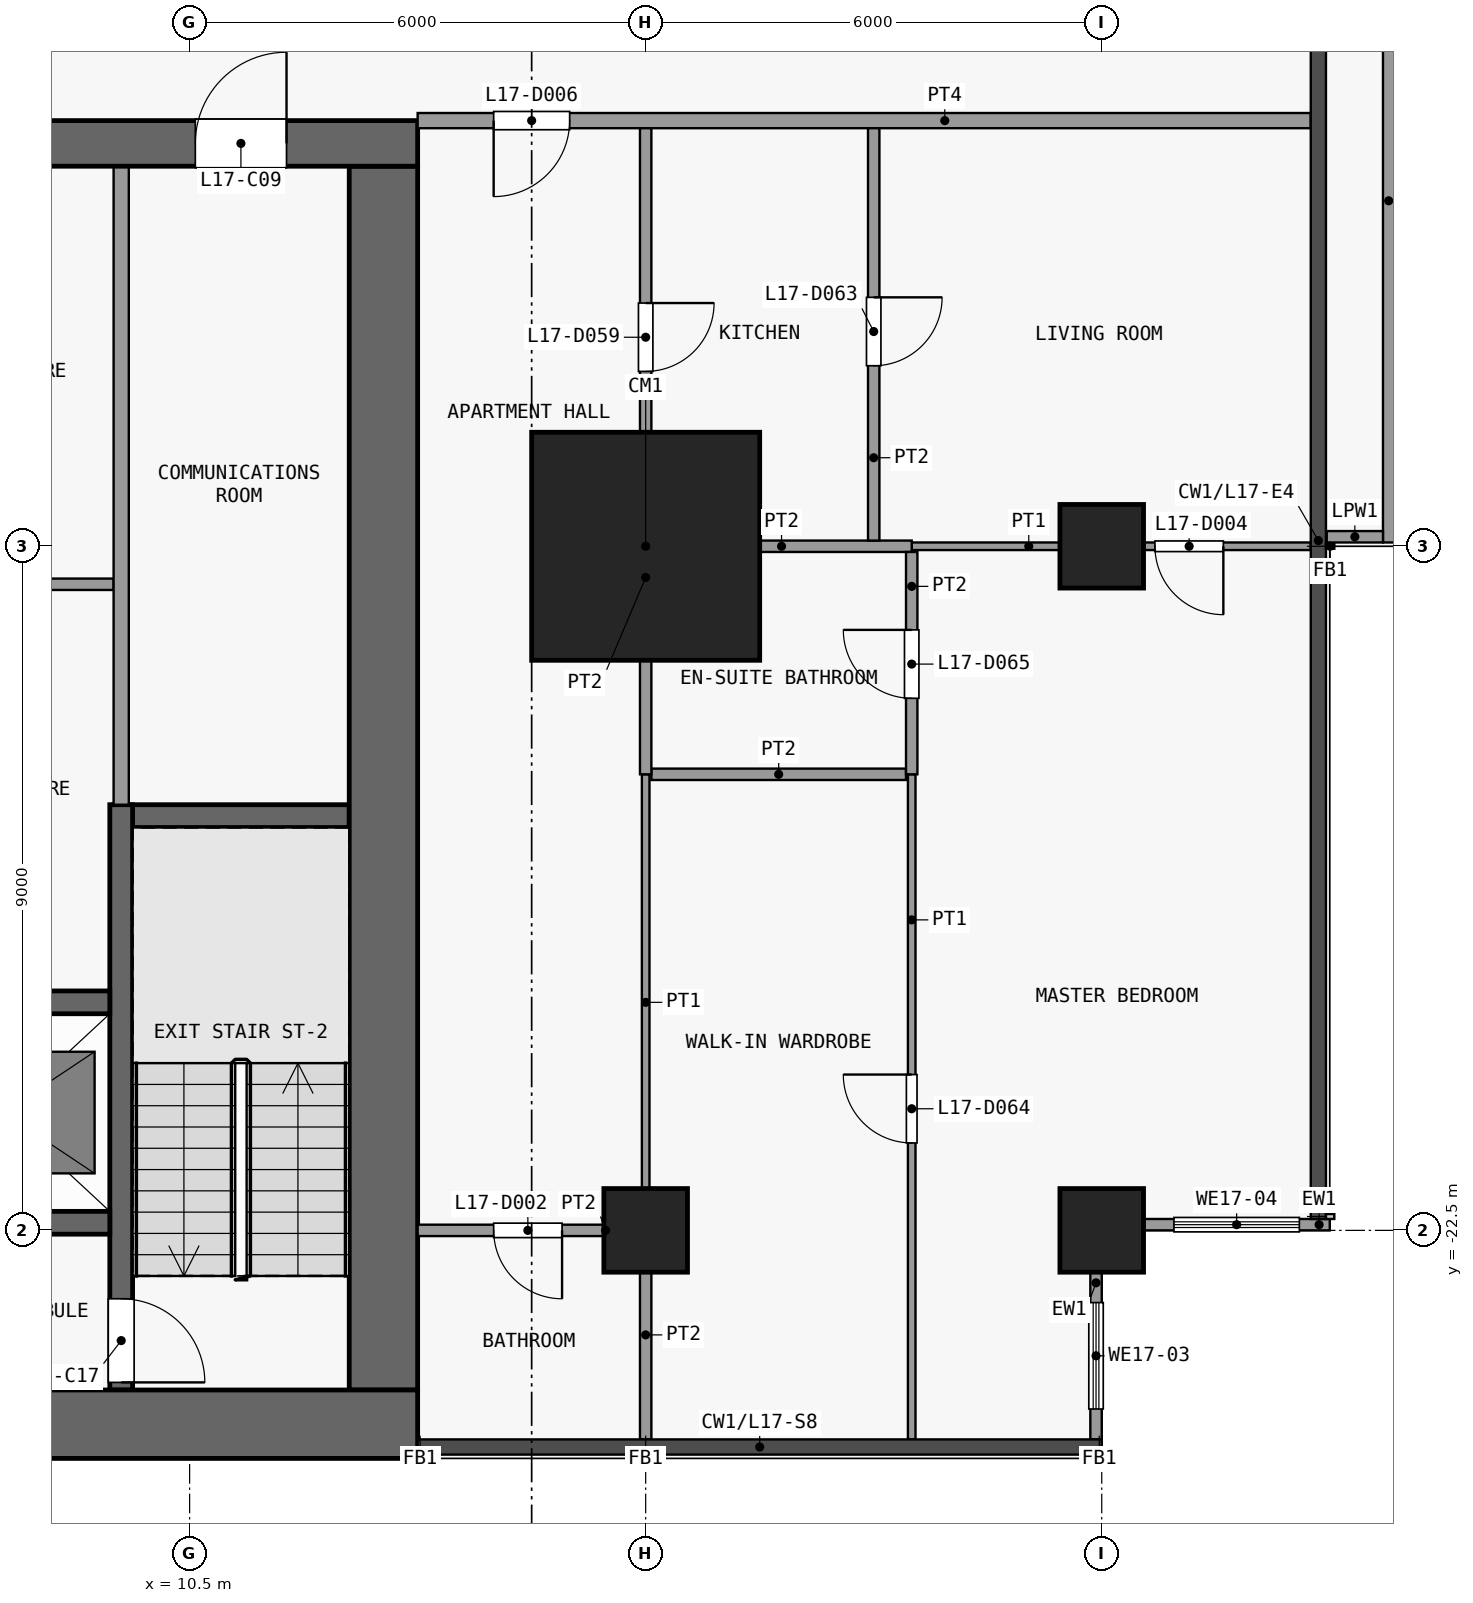
"""IFC4 building model, lengths in metres.
Left out: names, types, materials, properties, quantities, classifications, styles, units other than length and angle.
Written with IfcOpenShell. Run it as: python <this file> out.ifc"""

import sys

from ifc_helpers import new_model, si_unit, direction, frame, frame_2d, origin, origin_2d, place, context, subcontext, project, spatial, rectangle, extrude, element, fill, save


model = new_model("IFC4")
c1 = context("Model", 3, precision=1e-05, world=origin(), true_north=direction((0.0, 1.0)))
c2 = subcontext(c1, "Body", "Model", "MODEL_VIEW")
j1 = project(units=[si_unit("LENGTHUNIT", "METRE"), si_unit("PLANEANGLEUNIT", "RADIAN")], contexts=[c1])
p1 = place(None, origin())
s1 = spatial("IfcSite", under=j1, at=p1, CompositionType="ELEMENT")
p2 = place(p1, origin())
s2 = spatial("IfcBuilding", under=s1, at=p2, CompositionType="ELEMENT")
p3 = place(p2, frame((0.0, 0.0, 72.1)))
s3 = spatial("IfcBuildingStorey", under=s2, at=p3, CompositionType="ELEMENT", Elevation=72.1)
p4 = place(p3, frame((16.5, -22.5, 0.0), z_axis=(0.0, 0.0, 1.0), x_axis=(1.0, 0.0, 0.0)))
e1 = element("IfcColumn", 1, at=p4, inside=s3, PredefinedType="COLUMN", context=c2, shape_type="SweptSolid", body=[
    extrude(rectangle(XDim=1.1, YDim=1.1, at=origin_2d()), origin(), (0.0, 0.0, 1.0), 3.6),
])
p5 = place(p3, frame((16.5, -13.5, 0.0), z_axis=(0.0, 0.0, 1.0), x_axis=(1.0, 0.0, 0.0)))
e2 = element("IfcColumn", 2, at=p5, inside=s3, PredefinedType="COLUMN", context=c2, shape_type="SweptSolid", body=[
    extrude(rectangle(XDim=3.0, YDim=3.0, at=origin_2d()), origin(), (0.0, 0.0, 1.0), 3.6),
])
for number, where, z_axis, x_axis in (
    (3, (22.5, -22.5, 0.0), (0.0, 0.0, 1.0), (1.0, 0.0, 0.0)),
    (4, (22.5, -13.5, 0.0), (0.0, 0.0, 1.0), (1.0, 0.0, 0.0)),
):
    element("IfcColumn", number, at=place(p3, frame(where, z_axis=z_axis, x_axis=x_axis)), inside=s3, PredefinedType="COLUMN", context=c2, shape_type="SweptSolid", body=[
        extrude(rectangle(XDim=1.1, YDim=1.1, at=origin_2d()), origin(), (0.0, 0.0, 1.0), 3.6),
    ])
p6 = place(p3, frame((-13.5, -25.05, 0.0), z_axis=(0.0, 0.0, 1.0), x_axis=(1.0, 0.0, 0.0)))
e5 = element("IfcWall", 5, at=p6, inside=s3, PredefinedType="SHEAR", context=c2, shape_type="SweptSolid", body=[
    extrude(rectangle(XDim=27.0, YDim=0.9, at=frame_2d((13.5, 0.0))), origin(), (0.0, 0.0, 1.0), 3.15),
])
p7 = place(p3, frame((-13.5, -8.2, 0.0), z_axis=(0.0, 0.0, 1.0), x_axis=(1.0, 0.0, 0.0)))
e6 = element("IfcWall", 6, at=p7, inside=s3, PredefinedType="SHEAR", context=c2, shape_type="SweptSolid", body=[
    extrude(rectangle(XDim=27.0, YDim=0.6, at=frame_2d((13.5, 0.0))), origin(), (0.0, 0.0, 1.0), 3.15),
])
p8 = place(p7, frame((7.8, 0.0, 0.0)))
e7 = element("IfcOpeningElement", 7, at=p8, cuts=e6, PredefinedType="OPENING", context=c2, shape_type="SweptSolid", body=[
    extrude(rectangle(XDim=1.8, YDim=2.1, at=frame_2d((0.9, 1.05))), frame((0.0, 0.31, 0.0), z_axis=(0.0, -1.0, 0.0), x_axis=(1.0, 0.0, 0.0)), (0.0, 0.0, 1.0), 0.62),
])
p9 = place(p7, frame((17.4, 0.0, 0.0)))
e8 = element("IfcOpeningElement", 8, at=p9, cuts=e6, PredefinedType="OPENING", context=c2, shape_type="SweptSolid", body=[
    extrude(rectangle(XDim=1.8, YDim=2.1, at=frame_2d((0.9, 1.05))), frame((0.0, 0.31, 0.0), z_axis=(0.0, -1.0, 0.0), x_axis=(1.0, 0.0, 0.0)), (0.0, 0.0, 1.0), 0.62),
])
p10 = place(p7, frame((2.725, 0.0, 0.0)))
e9 = element("IfcOpeningElement", 9, at=p10, cuts=e6, PredefinedType="OPENING", context=c2, shape_type="SweptSolid", body=[
    extrude(rectangle(XDim=0.9, YDim=2.1, at=frame_2d((0.45, 1.05))), frame((0.0, 0.31, 0.0), z_axis=(0.0, -1.0, 0.0), x_axis=(1.0, 0.0, 0.0)), (0.0, 0.0, 1.0), 0.62),
])
p11 = place(p7, frame((24.075, 0.0, 0.0)))
e10 = element("IfcOpeningElement", 10, at=p11, cuts=e6, PredefinedType="OPENING", context=c2, shape_type="SweptSolid", body=[
    extrude(rectangle(XDim=1.2, YDim=2.1, at=frame_2d((0.6, 1.05))), frame((0.0, 0.31, 0.0), z_axis=(0.0, -1.0, 0.0), x_axis=(1.0, 0.0, 0.0)), (0.0, 0.0, 1.0), 0.62),
])
p12 = place(p3, frame((13.05, -24.6, 0.0), z_axis=(0.0, 0.0, 1.0), x_axis=(0.0, 1.0, 0.0)))
e11 = element("IfcWall", 11, at=p12, inside=s3, PredefinedType="SHEAR", context=c2, shape_type="SweptSolid", body=[
    extrude(rectangle(XDim=16.1, YDim=0.9, at=frame_2d((8.05, 0.0))), origin(), (0.0, 0.0, 1.0), 3.15),
])
p13 = place(p3, frame((6.35, -22.4, 0.0), z_axis=(0.0, 0.0, 1.0), x_axis=(1.0, 0.0, 0.0)))
e12 = element("IfcWall", 12, at=p13, inside=s3, PredefinedType="SHEAR", context=c2, shape_type="SweptSolid", body=[
    extrude(rectangle(XDim=3.1, YDim=0.3, at=frame_2d((1.55, 0.0))), origin(), (0.0, 0.0, 1.0), 3.15),
])
p14 = place(p3, frame((6.425, -19.5, 0.0), z_axis=(0.0, 0.0, 1.0), x_axis=(1.0, 0.0, 0.0)))
e13 = element("IfcWall", 13, at=p14, inside=s3, PredefinedType="SHEAR", context=c2, shape_type="SweptSolid", body=[
    extrude(rectangle(XDim=3.025, YDim=0.3, at=frame_2d((1.512, 0.0))), origin(), (0.0, 0.0, 1.0), 3.15),
])
p15 = place(p3, frame((9.5, -17.05, 0.0), z_axis=(0.0, 0.0, 1.0), x_axis=(1.0, 0.0, 0.0)))
e14 = element("IfcWall", 14, at=p15, inside=s3, PredefinedType="SHEAR", context=c2, shape_type="SweptSolid", body=[
    extrude(rectangle(XDim=3.1, YDim=0.3, at=frame_2d((1.55, 0.0))), origin(), (0.0, 0.0, 1.0), 3.15),
])
p16 = place(p3, frame((6.575, -14.0, 0.0), z_axis=(0.0, 0.0, 1.0), x_axis=(1.0, 0.0, 0.0)))
e15 = element("IfcWall", 15, at=p16, inside=s3, PredefinedType="PARTITIONING", context=c2, shape_type="SweptSolid", body=[
    extrude(rectangle(XDim=2.925, YDim=0.15, at=frame_2d((1.462, 0.0))), origin(), (0.0, 0.0, 1.0), 3.15),
])
p17 = place(p3, frame((9.6, -16.9, 0.0), z_axis=(0.0, 0.0, 1.0), x_axis=(0.0, -1.0, 0.0)))
e16 = element("IfcWall", 16, at=p17, inside=s3, PredefinedType="SHEAR", context=c2, shape_type="SweptSolid", body=[
    extrude(rectangle(XDim=7.7, YDim=0.3, at=frame_2d((3.85, 0.0))), origin(), (0.0, 0.0, 1.0), 3.15),
])
p18 = place(p17, frame((6.5, 0.0, 0.0)))
e17 = element("IfcOpeningElement", 17, at=p18, cuts=e16, PredefinedType="OPENING", context=c2, shape_type="SweptSolid", body=[
    extrude(rectangle(XDim=1.1, YDim=2.1, at=frame_2d((0.55, 1.05))), frame((0.0, 0.16, 0.0), z_axis=(0.0, -1.0, 0.0), x_axis=(1.0, 0.0, 0.0)), (0.0, 0.0, 1.0), 0.32),
])
p19 = place(p3, frame((9.6, -16.9, 0.0), z_axis=(0.0, 0.0, 1.0), x_axis=(0.0, 1.0, 0.0)))
e18 = element("IfcWall", 18, at=p19, inside=s3, PredefinedType="PARTITIONING", context=c2, shape_type="SweptSolid", body=[
    extrude(rectangle(XDim=8.4, YDim=0.2, at=frame_2d((4.2, 0.0))), origin(), (0.0, 0.0, 1.0), 3.15),
])
p20 = place(p3, frame((22.425, -23.05, 0.0), z_axis=(0.0, 0.0, 1.0), x_axis=(0.0, -1.0, 0.0)))
e19 = element("IfcWall", 19, at=p20, inside=s3, PredefinedType="SOLIDWALL", context=c2, shape_type="SweptSolid", body=[
    extrude(rectangle(XDim=2.2, YDim=0.15, at=frame_2d((1.1, 0.0))), origin(), (0.0, 0.0, 1.0), 3.15),
])
p21 = place(p20, frame((0.4, 0.0, 0.9)))
e20 = element("IfcOpeningElement", 20, at=p21, cuts=e19, PredefinedType="OPENING", context=c2, shape_type="SweptSolid", body=[
    extrude(rectangle(XDim=1.4, YDim=2.4, at=frame_2d((0.7, 1.2))), frame((0.0, 0.085, 0.0), z_axis=(0.0, -1.0, 0.0), x_axis=(1.0, 0.0, 0.0)), (0.0, 0.0, 1.0), 0.17),
])
p22 = place(p3, frame((25.5, -22.425, 0.0), z_axis=(0.0, 0.0, 1.0), x_axis=(-1.0, 0.0, 0.0)))
e21 = element("IfcWall", 21, at=p22, inside=s3, PredefinedType="SOLIDWALL", context=c2, shape_type="SweptSolid", body=[
    extrude(rectangle(XDim=2.45, YDim=0.15, at=frame_2d((1.225, 0.0))), origin(), (0.0, 0.0, 1.0), 3.15),
])
p23 = place(p22, frame((0.4, 0.0, 0.9)))
e22 = element("IfcOpeningElement", 22, at=p23, cuts=e21, PredefinedType="OPENING", context=c2, shape_type="SweptSolid", body=[
    extrude(rectangle(XDim=1.65, YDim=2.4, at=frame_2d((0.825, 1.2))), frame((0.0, 0.085, 0.0), z_axis=(0.0, -1.0, 0.0), x_axis=(1.0, 0.0, 0.0)), (0.0, 0.0, 1.0), 0.17),
])
p24 = place(p3, frame((26.275, -4.46, 0.0), z_axis=(0.0, 0.0, 1.0), x_axis=(0.0, -1.0, 0.0)))
e23 = element("IfcWall", 23, at=p24, inside=s3, PredefinedType="PARAPET", context=c2, shape_type="SweptSolid", body=[
    extrude(rectangle(XDim=8.99, YDim=0.15, at=frame_2d((4.495, 0.0))), origin(), (0.0, 0.0, 1.0), 1.15),
])
p25 = place(p3, frame((26.2, -13.375, 0.0), z_axis=(0.0, 0.0, 1.0), x_axis=(-1.0, 0.0, 0.0)))
e24 = element("IfcWall", 24, at=p25, inside=s3, PredefinedType="PARAPET", context=c2, shape_type="SweptSolid", body=[
    extrude(rectangle(XDim=0.74, YDim=0.15, at=frame_2d((0.37, 0.0))), origin(), (0.0, 0.0, 1.0), 1.15),
])
p26 = place(p3, frame((13.5, -22.5, 0.0), z_axis=(0.0, 0.0, 1.0), x_axis=(1.0, 0.0, 0.0)))
e25 = element("IfcWall", 25, at=p26, inside=s3, PredefinedType="PARTITIONING", context=c2, shape_type="SweptSolid", body=[
    extrude(rectangle(XDim=2.925, YDim=0.15, at=frame_2d((1.462, 0.0))), origin(), (0.0, 0.0, 1.0), 3.15),
])
p27 = place(p26, frame((1.0, 0.0, 0.0)))
e26 = element("IfcOpeningElement", 26, at=p27, cuts=e25, PredefinedType="OPENING", context=c2, shape_type="SweptSolid", body=[
    extrude(rectangle(XDim=0.9, YDim=2.1, at=frame_2d((0.45, 1.05))), frame((0.0, 0.085, 0.0), z_axis=(0.0, -1.0, 0.0), x_axis=(1.0, 0.0, 0.0)), (0.0, 0.0, 1.0), 0.17),
])
p28 = place(p3, frame((16.575, -16.5, 0.0), z_axis=(0.0, 0.0, 1.0), x_axis=(1.0, 0.0, 0.0)))
e27 = element("IfcWall", 27, at=p28, inside=s3, PredefinedType="PARTITIONING", context=c2, shape_type="SweptSolid", body=[
    extrude(rectangle(XDim=3.35, YDim=0.15, at=frame_2d((1.675, 0.0))), origin(), (0.0, 0.0, 1.0), 3.15),
])
p29 = place(p3, frame((20.0, -13.5, 0.0), z_axis=(0.0, 0.0, 1.0), x_axis=(1.0, 0.0, 0.0)))
e28 = element("IfcWall", 28, at=p29, inside=s3, PredefinedType="PARTITIONING", context=c2, shape_type="SweptSolid", body=[
    extrude(rectangle(XDim=5.25, YDim=0.1, at=frame_2d((2.625, 0.0))), origin(), (0.0, 0.0, 1.0), 3.15),
])
p30 = place(p29, frame((3.2, 0.0, 0.0)))
e29 = element("IfcOpeningElement", 29, at=p30, cuts=e28, PredefinedType="OPENING", context=c2, shape_type="SweptSolid", body=[
    extrude(rectangle(XDim=0.9, YDim=2.1, at=frame_2d((0.45, 1.05))), frame((0.0, 0.06, 0.0), z_axis=(0.0, -1.0, 0.0), x_axis=(1.0, 0.0, 0.0)), (0.0, 0.0, 1.0), 0.12),
])
p31 = place(p3, frame((16.575, -13.5, 0.0), z_axis=(0.0, 0.0, 1.0), x_axis=(1.0, 0.0, 0.0)))
e30 = element("IfcWall", 30, at=p31, inside=s3, PredefinedType="PARTITIONING", context=c2, shape_type="SweptSolid", body=[
    extrude(rectangle(XDim=3.425, YDim=0.15, at=frame_2d((1.712, 0.0))), origin(), (0.0, 0.0, 1.0), 3.15),
])
p32 = place(p3, frame((13.5, -7.9, 0.0), z_axis=(0.0, 0.0, 1.0), x_axis=(1.0, 0.0, 0.0)))
e31 = element("IfcWall", 31, at=p32, inside=s3, PredefinedType="PARTITIONING", context=c2, shape_type="SweptSolid", body=[
    extrude(rectangle(XDim=11.75, YDim=0.2, at=frame_2d((5.875, 0.0))), origin(), (0.0, 0.0, 1.0), 3.15),
])
p33 = place(p32, frame((1.0, 0.0, 0.0)))
e32 = element("IfcOpeningElement", 32, at=p33, cuts=e31, PredefinedType="OPENING", context=c2, shape_type="SweptSolid", body=[
    extrude(rectangle(XDim=1.0, YDim=2.1, at=frame_2d((0.5, 1.05))), frame((0.0, 0.11, 0.0), z_axis=(0.0, -1.0, 0.0), x_axis=(1.0, 0.0, 0.0)), (0.0, 0.0, 1.0), 0.22),
])
p34 = place(p3, frame((16.5, -22.5, 0.0), z_axis=(0.0, 0.0, 1.0), x_axis=(0.0, 1.0, 0.0)))
e33 = element("IfcWall", 33, at=p34, inside=s3, PredefinedType="PARTITIONING", context=c2, shape_type="SweptSolid", body=[
    extrude(rectangle(XDim=6.0, YDim=0.1, at=frame_2d((3.0, 0.0))), origin(), (0.0, 0.0, 1.0), 3.15),
])
p35 = place(p3, frame((16.5, -25.25, 0.0), z_axis=(0.0, 0.0, 1.0), x_axis=(0.0, 1.0, 0.0)))
e34 = element("IfcWall", 34, at=p35, inside=s3, PredefinedType="PARTITIONING", context=c2, shape_type="SweptSolid", body=[
    extrude(rectangle(XDim=2.75, YDim=0.15, at=frame_2d((1.375, 0.0))), origin(), (0.0, 0.0, 1.0), 3.15),
])
p36 = place(p3, frame((16.5, -16.5, 0.0), z_axis=(0.0, 0.0, 1.0), x_axis=(0.0, 1.0, 0.0)))
e35 = element("IfcWall", 35, at=p36, inside=s3, PredefinedType="PARTITIONING", context=c2, shape_type="SweptSolid", body=[
    extrude(rectangle(XDim=8.5, YDim=0.15, at=frame_2d((4.25, 0.0))), origin(), (0.0, 0.0, 1.0), 3.15),
])
p37 = place(p36, frame((5.3, 0.0, 0.0)))
e36 = element("IfcOpeningElement", 36, at=p37, cuts=e35, PredefinedType="OPENING", context=c2, shape_type="SweptSolid", body=[
    extrude(rectangle(XDim=0.9, YDim=2.1, at=frame_2d((0.45, 1.05))), frame((0.0, 0.085, 0.0), z_axis=(0.0, -1.0, 0.0), x_axis=(1.0, 0.0, 0.0)), (0.0, 0.0, 1.0), 0.17),
])
p38 = place(p3, frame((19.5, -13.425, 0.0), z_axis=(0.0, 0.0, 1.0), x_axis=(0.0, 1.0, 0.0)))
e37 = element("IfcWall", 37, at=p38, inside=s3, PredefinedType="PARTITIONING", context=c2, shape_type="SweptSolid", body=[
    extrude(rectangle(XDim=5.425, YDim=0.15, at=frame_2d((2.712, 0.0))), origin(), (0.0, 0.0, 1.0), 3.15),
])
p39 = place(p38, frame((2.3, 0.0, 0.0)))
e38 = element("IfcOpeningElement", 38, at=p39, cuts=e37, PredefinedType="OPENING", context=c2, shape_type="SweptSolid", body=[
    extrude(rectangle(XDim=0.9, YDim=2.1, at=frame_2d((0.45, 1.05))), frame((0.0, 0.085, 0.0), z_axis=(0.0, -1.0, 0.0), x_axis=(1.0, 0.0, 0.0)), (0.0, 0.0, 1.0), 0.17),
])
p40 = place(p3, frame((20.0, -25.25, 0.0), z_axis=(0.0, 0.0, 1.0), x_axis=(0.0, 1.0, 0.0)))
e39 = element("IfcWall", 39, at=p40, inside=s3, PredefinedType="PARTITIONING", context=c2, shape_type="SweptSolid", body=[
    extrude(rectangle(XDim=8.75, YDim=0.1, at=frame_2d((4.375, 0.0))), origin(), (0.0, 0.0, 1.0), 3.15),
])
p41 = place(p40, frame((3.9, 0.0, 0.0)))
e40 = element("IfcOpeningElement", 40, at=p41, cuts=e39, PredefinedType="OPENING", context=c2, shape_type="SweptSolid", body=[
    extrude(rectangle(XDim=0.9, YDim=2.1, at=frame_2d((0.45, 1.05))), frame((0.0, 0.06, 0.0), z_axis=(0.0, -1.0, 0.0), x_axis=(1.0, 0.0, 0.0)), (0.0, 0.0, 1.0), 0.12),
])
p42 = place(p3, frame((20.0, -16.5, 0.0), z_axis=(0.0, 0.0, 1.0), x_axis=(0.0, 1.0, 0.0)))
e41 = element("IfcWall", 41, at=p42, inside=s3, PredefinedType="PARTITIONING", context=c2, shape_type="SweptSolid", body=[
    extrude(rectangle(XDim=2.925, YDim=0.15, at=frame_2d((1.462, 0.0))), origin(), (0.0, 0.0, 1.0), 3.15),
])
p43 = place(p42, frame((1.0, 0.0, 0.0)))
e42 = element("IfcOpeningElement", 42, at=p43, cuts=e41, PredefinedType="OPENING", context=c2, shape_type="SweptSolid", body=[
    extrude(rectangle(XDim=0.9, YDim=2.1, at=frame_2d((0.45, 1.05))), frame((0.0, 0.085, 0.0), z_axis=(0.0, -1.0, 0.0), x_axis=(1.0, 0.0, 0.0)), (0.0, 0.0, 1.0), 0.17),
])
p44 = place(p11, origin())
e43 = element("IfcDoor", 43, at=p44, inside=s3, OperationType="SINGLE_SWING_RIGHT", PredefinedType="DOOR", context=c2, shape_type="SweptSolid", body=[
    extrude(rectangle(XDim=1.2, YDim=2.1, at=frame_2d((0.6, 1.05))), frame((0.0, 0.025, 0.0), z_axis=(0.0, -1.0, 0.0), x_axis=(1.0, 0.0, 0.0)), (0.0, 0.0, 1.0), 0.05),
])
fill(e10, e43)
p45 = place(p18, origin())
e44 = element("IfcDoor", 44, at=p45, inside=s3, OperationType="SINGLE_SWING_RIGHT", PredefinedType="DOOR", context=c2, shape_type="SweptSolid", body=[
    extrude(rectangle(XDim=1.1, YDim=2.1, at=frame_2d((0.55, 1.05))), frame((0.0, 0.025, 0.0), z_axis=(0.0, -1.0, 0.0), x_axis=(1.0, 0.0, 0.0)), (0.0, 0.0, 1.0), 0.05),
])
fill(e17, e44)
p46 = place(p21, origin())
e45 = element("IfcWindow", 45, at=p46, inside=s3, PartitioningType="SINGLE_PANEL", PredefinedType="WINDOW", context=c2, shape_type="SweptSolid", body=[
    extrude(rectangle(XDim=1.4, YDim=2.4, at=frame_2d((0.7, 1.2))), frame((0.0, 0.03, 0.0), z_axis=(0.0, -1.0, 0.0), x_axis=(1.0, 0.0, 0.0)), (0.0, 0.0, 1.0), 0.06),
])
fill(e20, e45)
p47 = place(p23, origin())
e46 = element("IfcWindow", 46, at=p47, inside=s3, PartitioningType="SINGLE_PANEL", PredefinedType="WINDOW", context=c2, shape_type="SweptSolid", body=[
    extrude(rectangle(XDim=1.65, YDim=2.4, at=frame_2d((0.825, 1.2))), frame((0.0, 0.03, 0.0), z_axis=(0.0, -1.0, 0.0), x_axis=(1.0, 0.0, 0.0)), (0.0, 0.0, 1.0), 0.06),
])
fill(e22, e46)
p48 = place(p27, origin())
e47 = element("IfcDoor", 47, at=p48, inside=s3, OperationType="SINGLE_SWING_RIGHT", PredefinedType="DOOR", context=c2, shape_type="SweptSolid", body=[
    extrude(rectangle(XDim=0.9, YDim=2.1, at=frame_2d((0.45, 1.05))), frame((0.0, 0.025, 0.0), z_axis=(0.0, -1.0, 0.0), x_axis=(1.0, 0.0, 0.0)), (0.0, 0.0, 1.0), 0.05),
])
fill(e26, e47)
p49 = place(p30, origin())
e48 = element("IfcDoor", 48, at=p49, inside=s3, OperationType="SINGLE_SWING_RIGHT", PredefinedType="DOOR", context=c2, shape_type="SweptSolid", body=[
    extrude(rectangle(XDim=0.9, YDim=2.1, at=frame_2d((0.45, 1.05))), frame((0.0, 0.025, 0.0), z_axis=(0.0, -1.0, 0.0), x_axis=(1.0, 0.0, 0.0)), (0.0, 0.0, 1.0), 0.05),
])
fill(e29, e48)
p50 = place(p33, origin())
e49 = element("IfcDoor", 49, at=p50, inside=s3, OperationType="SINGLE_SWING_LEFT", PredefinedType="DOOR", context=c2, shape_type="SweptSolid", body=[
    extrude(rectangle(XDim=1.0, YDim=2.1, at=frame_2d((0.5, 1.05))), frame((0.0, 0.025, 0.0), z_axis=(0.0, -1.0, 0.0), x_axis=(1.0, 0.0, 0.0)), (0.0, 0.0, 1.0), 0.05),
])
fill(e32, e49)
p51 = place(p37, origin())
e50 = element("IfcDoor", 50, at=p51, inside=s3, OperationType="SINGLE_SWING_RIGHT", PredefinedType="DOOR", context=c2, shape_type="SweptSolid", body=[
    extrude(rectangle(XDim=0.9, YDim=2.1, at=frame_2d((0.45, 1.05))), frame((0.0, 0.025, 0.0), z_axis=(0.0, -1.0, 0.0), x_axis=(1.0, 0.0, 0.0)), (0.0, 0.0, 1.0), 0.05),
])
fill(e36, e50)
p52 = place(p39, origin())
e51 = element("IfcDoor", 51, at=p52, inside=s3, OperationType="SINGLE_SWING_RIGHT", PredefinedType="DOOR", context=c2, shape_type="SweptSolid", body=[
    extrude(rectangle(XDim=0.9, YDim=2.1, at=frame_2d((0.45, 1.05))), frame((0.0, 0.025, 0.0), z_axis=(0.0, -1.0, 0.0), x_axis=(1.0, 0.0, 0.0)), (0.0, 0.0, 1.0), 0.05),
])
fill(e38, e51)
p53 = place(p41, origin())
e52 = element("IfcDoor", 52, at=p53, inside=s3, OperationType="SINGLE_SWING_LEFT", PredefinedType="DOOR", context=c2, shape_type="SweptSolid", body=[
    extrude(rectangle(XDim=0.9, YDim=2.1, at=frame_2d((0.45, 1.05))), frame((0.0, 0.025, 0.0), z_axis=(0.0, -1.0, 0.0), x_axis=(1.0, 0.0, 0.0)), (0.0, 0.0, 1.0), 0.05),
])
fill(e40, e52)
p54 = place(p43, origin())
e53 = element("IfcDoor", 53, at=p54, inside=s3, OperationType="SINGLE_SWING_LEFT", PredefinedType="DOOR", context=c2, shape_type="SweptSolid", body=[
    extrude(rectangle(XDim=0.9, YDim=2.1, at=frame_2d((0.45, 1.05))), frame((0.0, 0.025, 0.0), z_axis=(0.0, -1.0, 0.0), x_axis=(1.0, 0.0, 0.0)), (0.0, 0.0, 1.0), 0.05),
])
fill(e42, e53)
save(model, sys.argv[1])
